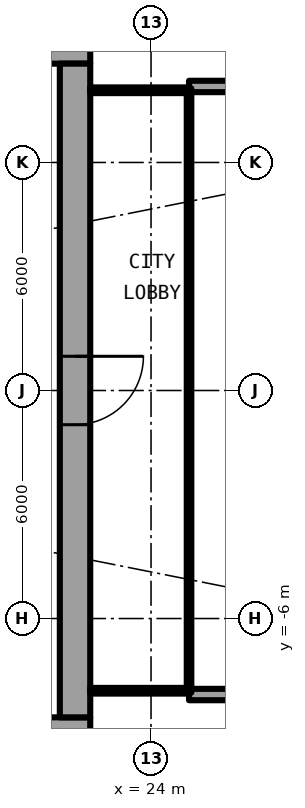
"""IFC4 building model, lengths in metres.
Left out: names, types, materials, properties, quantities, classifications, styles, units other than length and angle.
Written with IfcOpenShell. Run it as: python <this file> out.ifc"""

import sys

from ifc_helpers import new_model, si_unit, direction, frame, frame_2d, origin, place, context, subcontext, project, spatial, rectangle, extrude, element, fill, save


model = new_model("IFC4")
c1 = context("Model", 3, precision=1e-05, world=origin(), true_north=direction((0.0, 1.0)))
c2 = subcontext(c1, "Body", "Model", "MODEL_VIEW")
j1 = project(units=[si_unit("LENGTHUNIT", "METRE"), si_unit("PLANEANGLEUNIT", "RADIAN")], contexts=[c1])
p1 = place(None, origin())
s1 = spatial("IfcSite", under=j1, at=p1, CompositionType="ELEMENT")
p2 = place(p1, origin())
s2 = spatial("IfcBuilding", under=s1, at=p2, CompositionType="ELEMENT")
p3 = place(p2, frame((0.0, 0.0, 18.3)))
s3 = spatial("IfcBuildingStorey", under=s2, at=p3, CompositionType="ELEMENT", Elevation=18.3)
for number, where, z_axis, x_axis in (
    (1, (25.0, 8.0, 0.0), (0.0, 0.0, 1.0), (1.0, 0.0, 0.0)),
    (2, (25.0, -8.0, 0.0), (0.0, 0.0, 1.0), (1.0, 0.0, 0.0)),
):
    element("IfcWall", number, at=place(p3, frame(where, z_axis=z_axis, x_axis=x_axis)), inside=s3, PredefinedType="SOLIDWALL", context=c2, shape_type="SweptSolid", body=[
        extrude(rectangle(XDim=2.667, YDim=0.3, at=frame_2d((1.333, 0.0))), origin(), (0.0, 0.0, 1.0), 4.15),
    ])
p4 = place(p3, frame((22.4, 9.0, 0.0), z_axis=(0.0, 0.0, 1.0), x_axis=(-1.0, 0.0, 0.0)))
e3 = element("IfcWall", 3, at=p4, inside=s3, PredefinedType="SHEAR", context=c2, shape_type="SweptSolid", body=[
    extrude(rectangle(XDim=14.2, YDim=0.8, at=frame_2d((7.1, 0.0))), origin(), (0.0, 0.0, 1.0), 4.5),
])
p5 = place(p4, frame((1.325, 0.0, 0.0)))
e4 = element("IfcOpeningElement", 4, at=p5, cuts=e3, PredefinedType="OPENING", context=c2, shape_type="SweptSolid", body=[
    extrude(rectangle(XDim=1.2, YDim=2.3, at=frame_2d((0.6, 1.15))), frame((0.0, 0.41, 0.0), z_axis=(0.0, -1.0, 0.0), x_axis=(1.0, 0.0, 0.0)), (0.0, 0.0, 1.0), 0.82),
])
p6 = place(p3, frame((8.2, -9.0, 0.0), z_axis=(0.0, 0.0, 1.0), x_axis=(1.0, 0.0, 0.0)))
e5 = element("IfcWall", 5, at=p6, inside=s3, PredefinedType="SHEAR", context=c2, shape_type="SweptSolid", body=[
    extrude(rectangle(XDim=14.2, YDim=0.8, at=frame_2d((7.1, 0.0))), origin(), (0.0, 0.0, 1.0), 4.5),
])
p7 = place(p6, frame((11.675, 0.0, 0.0)))
e6 = element("IfcOpeningElement", 6, at=p7, cuts=e5, PredefinedType="OPENING", context=c2, shape_type="SweptSolid", body=[
    extrude(rectangle(XDim=1.2, YDim=2.3, at=frame_2d((0.6, 1.15))), frame((0.0, 0.41, 0.0), z_axis=(0.0, -1.0, 0.0), x_axis=(1.0, 0.0, 0.0)), (0.0, 0.0, 1.0), 0.82),
])
p8 = place(p3, frame((22.0, 8.6, 0.0), z_axis=(0.0, 0.0, 1.0), x_axis=(0.0, -1.0, 0.0)))
e7 = element("IfcWall", 7, at=p8, inside=s3, PredefinedType="SHEAR", context=c2, shape_type="SweptSolid", body=[
    extrude(rectangle(XDim=17.2, YDim=0.8, at=frame_2d((8.6, 0.0))), origin(), (0.0, 0.0, 1.0), 4.5),
])
p9 = place(p8, frame((7.7, 0.0, 0.0)))
e8 = element("IfcOpeningElement", 8, at=p9, cuts=e7, PredefinedType="OPENING", context=c2, shape_type="SweptSolid", body=[
    extrude(rectangle(XDim=1.8, YDim=2.3, at=frame_2d((0.9, 1.15))), frame((0.0, 0.41, 0.0), z_axis=(0.0, -1.0, 0.0), x_axis=(1.0, 0.0, 0.0)), (0.0, 0.0, 1.0), 0.82),
])
for number, where, z_axis, x_axis in (
    (9, (22.4, -7.9, 0.0), (0.0, 0.0, 1.0), (1.0, 0.0, 0.0)),
    (10, (22.4, 7.9, 0.0), (0.0, 0.0, 1.0), (1.0, 0.0, 0.0)),
):
    element("IfcWall", number, at=place(p3, frame(where, z_axis=z_axis, x_axis=x_axis)), inside=s3, PredefinedType="PARTITIONING", context=c2, shape_type="SweptSolid", body=[
        extrude(rectangle(XDim=2.54, YDim=0.15, at=frame_2d((1.27, 0.0))), origin(), (0.0, 0.0, 1.0), 4.15),
    ])
p10 = place(p3, frame((25.0, -7.95, 0.0), z_axis=(0.0, 0.0, 1.0), x_axis=(0.0, 1.0, 0.0)))
e11 = element("IfcWall", 11, at=p10, inside=s3, PredefinedType="PARTITIONING", context=c2, shape_type="SweptSolid", body=[
    extrude(rectangle(XDim=15.9, YDim=0.12, at=frame_2d((7.95, 0.0))), origin(), (0.0, 0.0, 1.0), 4.15),
])
p11 = place(p10, frame((0.95, 0.0, 0.1)))
e12 = element("IfcOpeningElement", 12, at=p11, cuts=e11, PredefinedType="OPENING", context=c2, shape_type="SweptSolid", body=[
    extrude(rectangle(XDim=14.0, YDim=3.8, at=frame_2d((7.0, 1.9))), frame((0.0, 0.07, 0.0), z_axis=(0.0, -1.0, 0.0), x_axis=(1.0, 0.0, 0.0)), (0.0, 0.0, 1.0), 0.14),
])
p12 = place(p9, origin())
e13 = element("IfcDoor", 13, at=p12, inside=s3, OperationType="SINGLE_SWING_LEFT", PredefinedType="DOOR", context=c2, shape_type="SweptSolid", body=[
    extrude(rectangle(XDim=1.8, YDim=2.3, at=frame_2d((0.9, 1.15))), frame((0.0, 0.025, 0.0), z_axis=(0.0, -1.0, 0.0), x_axis=(1.0, 0.0, 0.0)), (0.0, 0.0, 1.0), 0.05),
])
fill(e8, e13)
p13 = place(p11, origin())
e14 = element("IfcWindow", 14, at=p13, inside=s3, PartitioningType="SINGLE_PANEL", PredefinedType="WINDOW", context=c2, shape_type="SweptSolid", body=[
    extrude(rectangle(XDim=14.0, YDim=3.8, at=frame_2d((7.0, 1.9))), frame((0.0, 0.03, 0.0), z_axis=(0.0, -1.0, 0.0), x_axis=(1.0, 0.0, 0.0)), (0.0, 0.0, 1.0), 0.06),
])
fill(e12, e14)
save(model, sys.argv[1])
